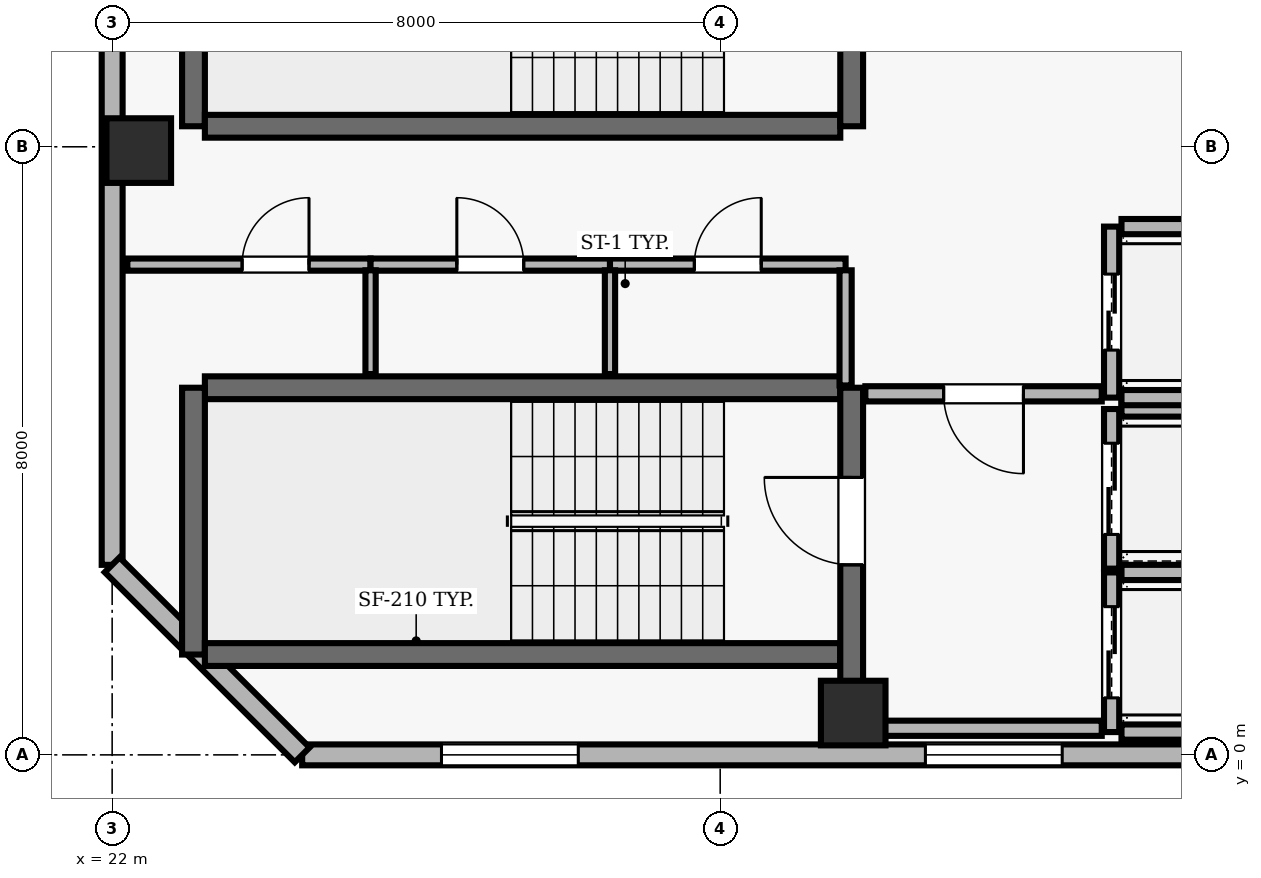
"""IFC4 building model, lengths in metres.
Left out: names, types, materials, properties, quantities, classifications, styles, units other than length and angle.
Written with IfcOpenShell. Run it as: python <this file> out.ifc"""

import sys

from ifc_helpers import new_model, si_unit, direction, frame, frame_2d, origin, origin_2d, place, context, subcontext, project, spatial, rectangle, extrude, element, fill, save


model = new_model("IFC4")
c1 = context("Model", 3, precision=1e-05, world=origin(), true_north=direction((0.0, 1.0)))
c2 = subcontext(c1, "Body", "Model", "MODEL_VIEW")
j1 = project(units=[si_unit("LENGTHUNIT", "METRE"), si_unit("PLANEANGLEUNIT", "RADIAN")], contexts=[c1])
p1 = place(None, origin())
s1 = spatial("IfcSite", under=j1, at=p1, CompositionType="ELEMENT")
p2 = place(p1, origin())
s2 = spatial("IfcBuilding", under=s1, at=p2, CompositionType="ELEMENT")
p3 = place(p2, frame((0.0, 0.0, 283.3)))
s3 = spatial("IfcBuildingStorey", under=s2, at=p3, CompositionType="ELEMENT", Elevation=283.3)
for number, where, z_axis, x_axis in (
    (1, (31.75, 0.55, 0.0), (0.0, 0.0, 1.0), (1.0, 0.0, 0.0)),
    (2, (22.35, 7.95, 0.0), (0.0, 0.0, 1.0), (1.0, 0.0, 0.0)),
):
    element("IfcColumn", number, at=place(p3, frame(where, z_axis=z_axis, x_axis=x_axis)), inside=s3, PredefinedType="COLUMN", context=c2, shape_type="SweptSolid", body=[
        extrude(rectangle(XDim=0.85, YDim=0.85, at=origin_2d()), origin(), (0.0, 0.0, 1.0), 3.9),
    ])
p4 = place(p3, frame((24.5, 0.0, 0.0), z_axis=(0.0, 0.0, 1.0), x_axis=(1.0, 0.0, 0.0)))
e3 = element("IfcWall", 3, at=p4, inside=s3, PredefinedType="SOLIDWALL", context=c2, shape_type="SweptSolid", body=[
    extrude(rectangle(XDim=32.8, YDim=0.275, at=frame_2d((16.4, 0.0))), origin(), (0.0, 0.0, 1.0), 3.69),
])
p5 = place(p4, frame((1.833, 0.0, 0.9)))
e4 = element("IfcOpeningElement", 4, at=p5, cuts=e3, PredefinedType="OPENING", context=c2, shape_type="SweptSolid", body=[
    extrude(rectangle(XDim=1.8, YDim=2.2, at=frame_2d((0.9, 1.1))), frame((0.0, 0.147, 0.0), z_axis=(0.0, -1.0, 0.0), x_axis=(1.0, 0.0, 0.0)), (0.0, 0.0, 1.0), 0.295),
])
p6 = place(p4, frame((8.2, 0.0, 0.9)))
e5 = element("IfcOpeningElement", 5, at=p6, cuts=e3, PredefinedType="OPENING", context=c2, shape_type="SweptSolid", body=[
    extrude(rectangle(XDim=1.8, YDim=2.2, at=frame_2d((0.9, 1.1))), frame((0.0, 0.147, 0.0), z_axis=(0.0, -1.0, 0.0), x_axis=(1.0, 0.0, 0.0)), (0.0, 0.0, 1.0), 0.295),
])
p7 = place(p4, frame((23.25, 0.0, 0.9)))
e6 = element("IfcOpeningElement", 6, at=p7, cuts=e3, PredefinedType="OPENING", context=c2, shape_type="SweptSolid", body=[
    extrude(rectangle(XDim=1.8, YDim=2.2, at=frame_2d((0.9, 1.1))), frame((0.0, 0.147, 0.0), z_axis=(0.0, -1.0, 0.0), x_axis=(1.0, 0.0, 0.0)), (0.0, 0.0, 1.0), 0.295),
])
p8 = place(p3, frame((22.0, 35.3, 0.0), z_axis=(0.0, 0.0, 1.0), x_axis=(0.0, -1.0, 0.0)))
e7 = element("IfcWall", 7, at=p8, inside=s3, PredefinedType="SOLIDWALL", context=c2, shape_type="SweptSolid", body=[
    extrude(rectangle(XDim=32.8, YDim=0.275, at=frame_2d((16.4, 0.0))), origin(), (0.0, 0.0, 1.0), 3.69),
])
p9 = place(p8, frame((7.3, 0.0, 0.0)))
e8 = element("IfcOpeningElement", 8, at=p9, cuts=e7, PredefinedType="OPENING", context=c2, shape_type="SweptSolid", body=[
    extrude(rectangle(XDim=1.0, YDim=2.2, at=frame_2d((0.5, 1.1))), frame((0.0, 0.147, 0.0), z_axis=(0.0, -1.0, 0.0), x_axis=(1.0, 0.0, 0.0)), (0.0, 0.0, 1.0), 0.295),
])
p10 = place(p8, frame((12.767, 0.0, 0.9)))
e9 = element("IfcOpeningElement", 9, at=p10, cuts=e7, PredefinedType="OPENING", context=c2, shape_type="SweptSolid", body=[
    extrude(rectangle(XDim=1.8, YDim=2.2, at=frame_2d((0.9, 1.1))), frame((0.0, 0.147, 0.0), z_axis=(0.0, -1.0, 0.0), x_axis=(1.0, 0.0, 0.0)), (0.0, 0.0, 1.0), 0.295),
])
p11 = place(p8, frame((18.233, 0.0, 0.9)))
e10 = element("IfcOpeningElement", 10, at=p11, cuts=e7, PredefinedType="OPENING", context=c2, shape_type="SweptSolid", body=[
    extrude(rectangle(XDim=1.8, YDim=2.2, at=frame_2d((0.9, 1.1))), frame((0.0, 0.147, 0.0), z_axis=(0.0, -1.0, 0.0), x_axis=(1.0, 0.0, 0.0)), (0.0, 0.0, 1.0), 0.295),
])
p12 = place(p8, frame((23.7, 0.0, 0.9)))
e11 = element("IfcOpeningElement", 11, at=p12, cuts=e7, PredefinedType="OPENING", context=c2, shape_type="SweptSolid", body=[
    extrude(rectangle(XDim=1.8, YDim=2.2, at=frame_2d((0.9, 1.1))), frame((0.0, 0.147, 0.0), z_axis=(0.0, -1.0, 0.0), x_axis=(1.0, 0.0, 0.0)), (0.0, 0.0, 1.0), 0.295),
])
p13 = place(p3, frame((22.0, 2.5, 0.0), z_axis=(0.0, 0.0, 1.0), x_axis=(0.707106781187, -0.707106781187, 0.0)))
e12 = element("IfcWall", 12, at=p13, inside=s3, PredefinedType="SOLIDWALL", context=c2, shape_type="SweptSolid", body=[
    extrude(rectangle(XDim=3.536, YDim=0.275, at=frame_2d((1.768, 0.0))), origin(), (0.0, 0.0, 1.0), 3.69),
])
p14 = place(p3, frame((31.58, 4.83, 0.0), z_axis=(0.0, 0.0, 1.0), x_axis=(-1.0, 0.0, 0.0)))
e13 = element("IfcWall", 13, at=p14, inside=s3, PredefinedType="SHEAR", context=c2, shape_type="SweptSolid", body=[
    extrude(rectangle(XDim=8.36, YDim=0.3, at=frame_2d((4.18, 0.0))), origin(), (0.0, 0.0, 1.0), 3.69),
])
p15 = place(p3, frame((23.07, 4.83, 0.0), z_axis=(0.0, 0.0, 1.0), x_axis=(0.0, -1.0, 0.0)))
e14 = element("IfcWall", 14, at=p15, inside=s3, PredefinedType="SHEAR", context=c2, shape_type="SweptSolid", body=[
    extrude(rectangle(XDim=3.51, YDim=0.3, at=frame_2d((1.755, 0.0))), origin(), (0.0, 0.0, 1.0), 3.69),
])
p16 = place(p3, frame((23.22, 1.32, 0.0), z_axis=(0.0, 0.0, 1.0), x_axis=(1.0, 0.0, 0.0)))
e15 = element("IfcWall", 15, at=p16, inside=s3, PredefinedType="SHEAR", context=c2, shape_type="SweptSolid", body=[
    extrude(rectangle(XDim=8.36, YDim=0.3, at=frame_2d((4.18, 0.0))), origin(), (0.0, 0.0, 1.0), 3.69),
])
p17 = place(p3, frame((31.73, 0.96, 0.0), z_axis=(0.0, 0.0, 1.0), x_axis=(0.0, 1.0, 0.0)))
e16 = element("IfcWall", 16, at=p17, inside=s3, PredefinedType="SHEAR", context=c2, shape_type="SweptSolid", body=[
    extrude(rectangle(XDim=3.87, YDim=0.3, at=frame_2d((1.935, 0.0))), origin(), (0.0, 0.0, 1.0), 3.69),
])
p18 = place(p17, frame((1.54, 0.0, 0.0)))
e17 = element("IfcOpeningElement", 17, at=p18, cuts=e16, PredefinedType="OPENING", context=c2, shape_type="SweptSolid", body=[
    extrude(rectangle(XDim=1.15, YDim=2.15, at=frame_2d((0.575, 1.075))), frame((0.0, 0.16, 0.0), z_axis=(0.0, -1.0, 0.0), x_axis=(1.0, 0.0, 0.0)), (0.0, 0.0, 1.0), 0.32),
])
p19 = place(p3, frame((23.07, 11.78, 0.0), z_axis=(0.0, 0.0, 1.0), x_axis=(0.0, -1.0, 0.0)))
e18 = element("IfcWall", 18, at=p19, inside=s3, PredefinedType="SHEAR", context=c2, shape_type="SweptSolid", body=[
    extrude(rectangle(XDim=3.51, YDim=0.3, at=frame_2d((1.755, 0.0))), origin(), (0.0, 0.0, 1.0), 3.69),
])
p20 = place(p3, frame((23.22, 8.27, 0.0), z_axis=(0.0, 0.0, 1.0), x_axis=(1.0, 0.0, 0.0)))
e19 = element("IfcWall", 19, at=p20, inside=s3, PredefinedType="SHEAR", context=c2, shape_type="SweptSolid", body=[
    extrude(rectangle(XDim=8.36, YDim=0.3, at=frame_2d((4.18, 0.0))), origin(), (0.0, 0.0, 1.0), 3.69),
])
p21 = place(p3, frame((31.73, 8.27, 0.0), z_axis=(0.0, 0.0, 1.0), x_axis=(0.0, 1.0, 0.0)))
e20 = element("IfcWall", 20, at=p21, inside=s3, PredefinedType="SHEAR", context=c2, shape_type="SweptSolid", body=[
    extrude(rectangle(XDim=3.51, YDim=0.3, at=frame_2d((1.755, 0.0))), origin(), (0.0, 0.0, 1.0), 3.69),
])
p22 = place(p21, frame((1.18, 0.0, 0.0)))
e21 = element("IfcOpeningElement", 21, at=p22, cuts=e20, PredefinedType="OPENING", context=c2, shape_type="SweptSolid", body=[
    extrude(rectangle(XDim=1.15, YDim=2.15, at=frame_2d((0.575, 1.075))), frame((0.0, 0.16, 0.0), z_axis=(0.0, -1.0, 0.0), x_axis=(1.0, 0.0, 0.0)), (0.0, 0.0, 1.0), 0.32),
])
p23 = place(p3, frame((35.15, 2.4, 0.0), z_axis=(0.0, 0.0, 1.0), x_axis=(0.0, -1.0, 0.0)))
e22 = element("IfcWall", 22, at=p23, inside=s3, PredefinedType="SOLIDWALL", context=c2, shape_type="SweptSolid", body=[
    extrude(rectangle(XDim=2.1, YDim=0.2, at=frame_2d((1.05, 0.0))), origin(), (0.0, 0.0, 1.0), 3.69),
])
p24 = place(p23, frame((0.45, 0.0, 0.0)))
e23 = element("IfcOpeningElement", 23, at=p24, cuts=e22, PredefinedType="OPENING", context=c2, shape_type="SweptSolid", body=[
    extrude(rectangle(XDim=1.2, YDim=2.15, at=frame_2d((0.6, 1.075))), frame((0.0, 0.11, 0.0), z_axis=(0.0, -1.0, 0.0), x_axis=(1.0, 0.0, 0.0)), (0.0, 0.0, 1.0), 0.22),
])
for number, where, z_axis, x_axis in (
    (24, (35.28, 0.3, 0.0), (0.0, 0.0, 1.0), (1.0, 0.0, 0.0)),
    (25, (37.42, 2.4, 0.0), (0.0, 0.0, 1.0), (-1.0, 0.0, 0.0)),
):
    element("IfcWall", number, at=place(p3, frame(where, z_axis=z_axis, x_axis=x_axis)), inside=s3, PredefinedType="SOLIDWALL", context=c2, shape_type="SweptSolid", body=[
        extrude(rectangle(XDim=2.14, YDim=0.2, at=frame_2d((1.07, 0.0))), origin(), (0.0, 0.0, 1.0), 3.69),
    ])
p25 = place(p3, frame((35.15, 4.55, 0.0), z_axis=(0.0, 0.0, 1.0), x_axis=(0.0, -1.0, 0.0)))
e26 = element("IfcWall", 26, at=p25, inside=s3, PredefinedType="SOLIDWALL", context=c2, shape_type="SweptSolid", body=[
    extrude(rectangle(XDim=2.1, YDim=0.2, at=frame_2d((1.05, 0.0))), origin(), (0.0, 0.0, 1.0), 3.69),
])
p26 = place(p25, frame((0.45, 0.0, 0.0)))
e27 = element("IfcOpeningElement", 27, at=p26, cuts=e26, PredefinedType="OPENING", context=c2, shape_type="SweptSolid", body=[
    extrude(rectangle(XDim=1.2, YDim=2.15, at=frame_2d((0.6, 1.075))), frame((0.0, 0.11, 0.0), z_axis=(0.0, -1.0, 0.0), x_axis=(1.0, 0.0, 0.0)), (0.0, 0.0, 1.0), 0.22),
])
p27 = place(p3, frame((37.42, 4.55, 0.0), z_axis=(0.0, 0.0, 1.0), x_axis=(-1.0, 0.0, 0.0)))
e28 = element("IfcWall", 28, at=p27, inside=s3, PredefinedType="SOLIDWALL", context=c2, shape_type="SweptSolid", body=[
    extrude(rectangle(XDim=2.14, YDim=0.2, at=frame_2d((1.07, 0.0))), origin(), (0.0, 0.0, 1.0), 3.69),
])
p28 = place(p3, frame((35.15, 6.95, 0.0), z_axis=(0.0, 0.0, 1.0), x_axis=(0.0, -1.0, 0.0)))
e29 = element("IfcWall", 29, at=p28, inside=s3, PredefinedType="SOLIDWALL", context=c2, shape_type="SweptSolid", body=[
    extrude(rectangle(XDim=2.25, YDim=0.2, at=frame_2d((1.125, 0.0))), origin(), (0.0, 0.0, 1.0), 3.69),
])
p29 = place(p28, frame((0.625, 0.0, 0.0)))
e30 = element("IfcOpeningElement", 30, at=p29, cuts=e29, PredefinedType="OPENING", context=c2, shape_type="SweptSolid", body=[
    extrude(rectangle(XDim=1.0, YDim=2.1, at=frame_2d((0.5, 1.05))), frame((0.0, 0.11, 0.0), z_axis=(0.0, -1.0, 0.0), x_axis=(1.0, 0.0, 0.0)), (0.0, 0.0, 1.0), 0.22),
])
for number, where, z_axis, x_axis in (
    (31, (35.28, 4.7, 0.0), (0.0, 0.0, 1.0), (1.0, 0.0, 0.0)),
    (32, (37.42, 6.95, 0.0), (0.0, 0.0, 1.0), (-1.0, 0.0, 0.0)),
):
    element("IfcWall", number, at=place(p3, frame(where, z_axis=z_axis, x_axis=x_axis)), inside=s3, PredefinedType="SOLIDWALL", context=c2, shape_type="SweptSolid", body=[
        extrude(rectangle(XDim=2.14, YDim=0.2, at=frame_2d((1.07, 0.0))), origin(), (0.0, 0.0, 1.0), 3.69),
    ])
p30 = place(p3, frame((22.2, 6.45, 0.0), z_axis=(0.0, 0.0, 1.0), x_axis=(1.0, 0.0, 0.0)))
e33 = element("IfcWall", 33, at=p30, inside=s3, PredefinedType="PARTITIONING", context=c2, shape_type="SweptSolid", body=[
    extrude(rectangle(XDim=3.2, YDim=0.16, at=frame_2d((1.6, 0.0))), origin(), (0.0, 0.0, 1.0), 3.69),
])
p31 = place(p30, frame((1.51, 0.0, 0.0)))
e34 = element("IfcOpeningElement", 34, at=p31, cuts=e33, PredefinedType="OPENING", context=c2, shape_type="SweptSolid", body=[
    extrude(rectangle(XDim=0.88, YDim=2.1, at=frame_2d((0.44, 1.05))), frame((0.0, 0.09, 0.0), z_axis=(0.0, -1.0, 0.0), x_axis=(1.0, 0.0, 0.0)), (0.0, 0.0, 1.0), 0.18),
])
p32 = place(p3, frame((25.4, 6.45, 0.0), z_axis=(0.0, 0.0, 1.0), x_axis=(1.0, 0.0, 0.0)))
e35 = element("IfcWall", 35, at=p32, inside=s3, PredefinedType="PARTITIONING", context=c2, shape_type="SweptSolid", body=[
    extrude(rectangle(XDim=3.15, YDim=0.16, at=frame_2d((1.575, 0.0))), origin(), (0.0, 0.0, 1.0), 3.69),
])
p33 = place(p32, frame((1.135, 0.0, 0.0)))
e36 = element("IfcOpeningElement", 36, at=p33, cuts=e35, PredefinedType="OPENING", context=c2, shape_type="SweptSolid", body=[
    extrude(rectangle(XDim=0.88, YDim=2.1, at=frame_2d((0.44, 1.05))), frame((0.0, 0.09, 0.0), z_axis=(0.0, -1.0, 0.0), x_axis=(1.0, 0.0, 0.0)), (0.0, 0.0, 1.0), 0.18),
])
p34 = place(p3, frame((28.55, 6.45, 0.0), z_axis=(0.0, 0.0, 1.0), x_axis=(1.0, 0.0, 0.0)))
e37 = element("IfcWall", 37, at=p34, inside=s3, PredefinedType="PARTITIONING", context=c2, shape_type="SweptSolid", body=[
    extrude(rectangle(XDim=3.1, YDim=0.16, at=frame_2d((1.55, 0.0))), origin(), (0.0, 0.0, 1.0), 3.69),
])
p35 = place(p34, frame((1.11, 0.0, 0.0)))
e38 = element("IfcOpeningElement", 38, at=p35, cuts=e37, PredefinedType="OPENING", context=c2, shape_type="SweptSolid", body=[
    extrude(rectangle(XDim=0.88, YDim=2.1, at=frame_2d((0.44, 1.05))), frame((0.0, 0.09, 0.0), z_axis=(0.0, -1.0, 0.0), x_axis=(1.0, 0.0, 0.0)), (0.0, 0.0, 1.0), 0.18),
])
p36 = place(p3, frame((31.65, 0.35, 0.0), z_axis=(0.0, 0.0, 1.0), x_axis=(1.0, 0.0, 0.0)))
e39 = element("IfcWall", 39, at=p36, inside=s3, PredefinedType="SOLIDWALL", context=c2, shape_type="SweptSolid", body=[
    extrude(rectangle(XDim=3.37, YDim=0.2, at=frame_2d((1.685, 0.0))), origin(), (0.0, 0.0, 1.0), 3.69),
])
p37 = place(p3, frame((35.02, 4.75, 0.0), z_axis=(0.0, 0.0, 1.0), x_axis=(-1.0, 0.0, 0.0)))
e40 = element("IfcWall", 40, at=p37, inside=s3, PredefinedType="SOLIDWALL", context=c2, shape_type="SweptSolid", body=[
    extrude(rectangle(XDim=3.11, YDim=0.2, at=frame_2d((1.555, 0.0))), origin(), (0.0, 0.0, 1.0), 3.69),
])
p38 = place(p37, frame((1.03, 0.0, 0.0)))
e41 = element("IfcOpeningElement", 41, at=p38, cuts=e40, PredefinedType="OPENING", context=c2, shape_type="SweptSolid", body=[
    extrude(rectangle(XDim=1.05, YDim=2.15, at=frame_2d((0.525, 1.075))), frame((0.0, 0.11, 0.0), z_axis=(0.0, -1.0, 0.0), x_axis=(1.0, 0.0, 0.0)), (0.0, 0.0, 1.0), 0.22),
])
for number, where, z_axis, x_axis in (
    (42, (25.4, 5.01, 0.0), (0.0, 0.0, 1.0), (0.0, 1.0, 0.0)),
    (43, (28.55, 5.01, 0.0), (0.0, 0.0, 1.0), (0.0, 1.0, 0.0)),
):
    element("IfcWall", number, at=place(p3, frame(where, z_axis=z_axis, x_axis=x_axis)), inside=s3, PredefinedType="PARTITIONING", context=c2, shape_type="SweptSolid", body=[
        extrude(rectangle(XDim=1.365, YDim=0.135, at=frame_2d((0.683, 0.0))), origin(), (0.0, 0.0, 1.0), 3.69),
    ])
p39 = place(p3, frame((31.65, 4.86, 0.0), z_axis=(0.0, 0.0, 1.0), x_axis=(0.0, 1.0, 0.0)))
e44 = element("IfcWall", 44, at=p39, inside=s3, PredefinedType="PARTITIONING", context=c2, shape_type="SweptSolid", body=[
    extrude(rectangle(XDim=1.515, YDim=0.16, at=frame_2d((0.757, 0.0))), origin(), (0.0, 0.0, 1.0), 3.69),
])
p40 = place(p5, origin())
e45 = element("IfcWindow", 45, at=p40, inside=s3, PartitioningType="SINGLE_PANEL", PredefinedType="WINDOW", context=c2, shape_type="SweptSolid", body=[
    extrude(rectangle(XDim=1.8, YDim=2.2, at=frame_2d((0.9, 1.1))), frame((0.0, 0.03, 0.0), z_axis=(0.0, -1.0, 0.0), x_axis=(1.0, 0.0, 0.0)), (0.0, 0.0, 1.0), 0.06),
])
fill(e4, e45)
p41 = place(p6, origin())
e46 = element("IfcWindow", 46, at=p41, inside=s3, PartitioningType="SINGLE_PANEL", PredefinedType="WINDOW", context=c2, shape_type="SweptSolid", body=[
    extrude(rectangle(XDim=1.8, YDim=2.2, at=frame_2d((0.9, 1.1))), frame((0.0, 0.03, 0.0), z_axis=(0.0, -1.0, 0.0), x_axis=(1.0, 0.0, 0.0)), (0.0, 0.0, 1.0), 0.06),
])
fill(e5, e46)
p42 = place(p18, origin())
e47 = element("IfcDoor", 47, at=p42, inside=s3, OperationType="SINGLE_SWING_RIGHT", PredefinedType="DOOR", context=c2, shape_type="SweptSolid", body=[
    extrude(rectangle(XDim=1.15, YDim=2.15, at=frame_2d((0.575, 1.075))), frame((0.0, 0.025, 0.0), z_axis=(0.0, -1.0, 0.0), x_axis=(1.0, 0.0, 0.0)), (0.0, 0.0, 1.0), 0.05),
])
fill(e17, e47)
p43 = place(p24, origin())
e48 = element("IfcDoor", 48, at=p43, inside=s3, OperationType="DOUBLE_DOOR_SLIDING", PredefinedType="DOOR", context=c2, shape_type="SweptSolid", body=[
    extrude(rectangle(XDim=1.2, YDim=2.15, at=frame_2d((0.6, 1.075))), frame((0.0, 0.025, 0.0), z_axis=(0.0, -1.0, 0.0), x_axis=(1.0, 0.0, 0.0)), (0.0, 0.0, 1.0), 0.05),
])
fill(e23, e48)
p44 = place(p26, origin())
e49 = element("IfcDoor", 49, at=p44, inside=s3, OperationType="DOUBLE_DOOR_SLIDING", PredefinedType="DOOR", context=c2, shape_type="SweptSolid", body=[
    extrude(rectangle(XDim=1.2, YDim=2.15, at=frame_2d((0.6, 1.075))), frame((0.0, 0.025, 0.0), z_axis=(0.0, -1.0, 0.0), x_axis=(1.0, 0.0, 0.0)), (0.0, 0.0, 1.0), 0.05),
])
fill(e27, e49)
p45 = place(p29, origin())
e50 = element("IfcDoor", 50, at=p45, inside=s3, OperationType="DOUBLE_DOOR_SLIDING", PredefinedType="DOOR", context=c2, shape_type="SweptSolid", body=[
    extrude(rectangle(XDim=1.0, YDim=2.1, at=frame_2d((0.5, 1.05))), frame((0.0, 0.025, 0.0), z_axis=(0.0, -1.0, 0.0), x_axis=(1.0, 0.0, 0.0)), (0.0, 0.0, 1.0), 0.05),
])
fill(e30, e50)
p46 = place(p38, origin())
e51 = element("IfcDoor", 51, at=p46, inside=s3, OperationType="SINGLE_SWING_LEFT", PredefinedType="DOOR", context=c2, shape_type="SweptSolid", body=[
    extrude(rectangle(XDim=1.05, YDim=2.15, at=frame_2d((0.525, 1.075))), frame((0.0, 0.025, 0.0), z_axis=(0.0, -1.0, 0.0), x_axis=(1.0, 0.0, 0.0)), (0.0, 0.0, 1.0), 0.05),
])
fill(e41, e51)
p47 = place(p31, origin())
e52 = element("IfcDoor", 52, at=p47, inside=s3, OperationType="SINGLE_SWING_RIGHT", PredefinedType="DOOR", context=c2, shape_type="SweptSolid", body=[
    extrude(rectangle(XDim=0.88, YDim=2.1, at=frame_2d((0.44, 1.05))), frame((0.0, 0.025, 0.0), z_axis=(0.0, -1.0, 0.0), x_axis=(1.0, 0.0, 0.0)), (0.0, 0.0, 1.0), 0.05),
])
fill(e34, e52)
p48 = place(p33, origin())
e53 = element("IfcDoor", 53, at=p48, inside=s3, OperationType="SINGLE_SWING_LEFT", PredefinedType="DOOR", context=c2, shape_type="SweptSolid", body=[
    extrude(rectangle(XDim=0.88, YDim=2.1, at=frame_2d((0.44, 1.05))), frame((0.0, 0.025, 0.0), z_axis=(0.0, -1.0, 0.0), x_axis=(1.0, 0.0, 0.0)), (0.0, 0.0, 1.0), 0.05),
])
fill(e36, e53)
p49 = place(p35, origin())
e54 = element("IfcDoor", 54, at=p49, inside=s3, OperationType="SINGLE_SWING_RIGHT", PredefinedType="DOOR", context=c2, shape_type="SweptSolid", body=[
    extrude(rectangle(XDim=0.88, YDim=2.1, at=frame_2d((0.44, 1.05))), frame((0.0, 0.025, 0.0), z_axis=(0.0, -1.0, 0.0), x_axis=(1.0, 0.0, 0.0)), (0.0, 0.0, 1.0), 0.05),
])
fill(e38, e54)
save(model, sys.argv[1])
